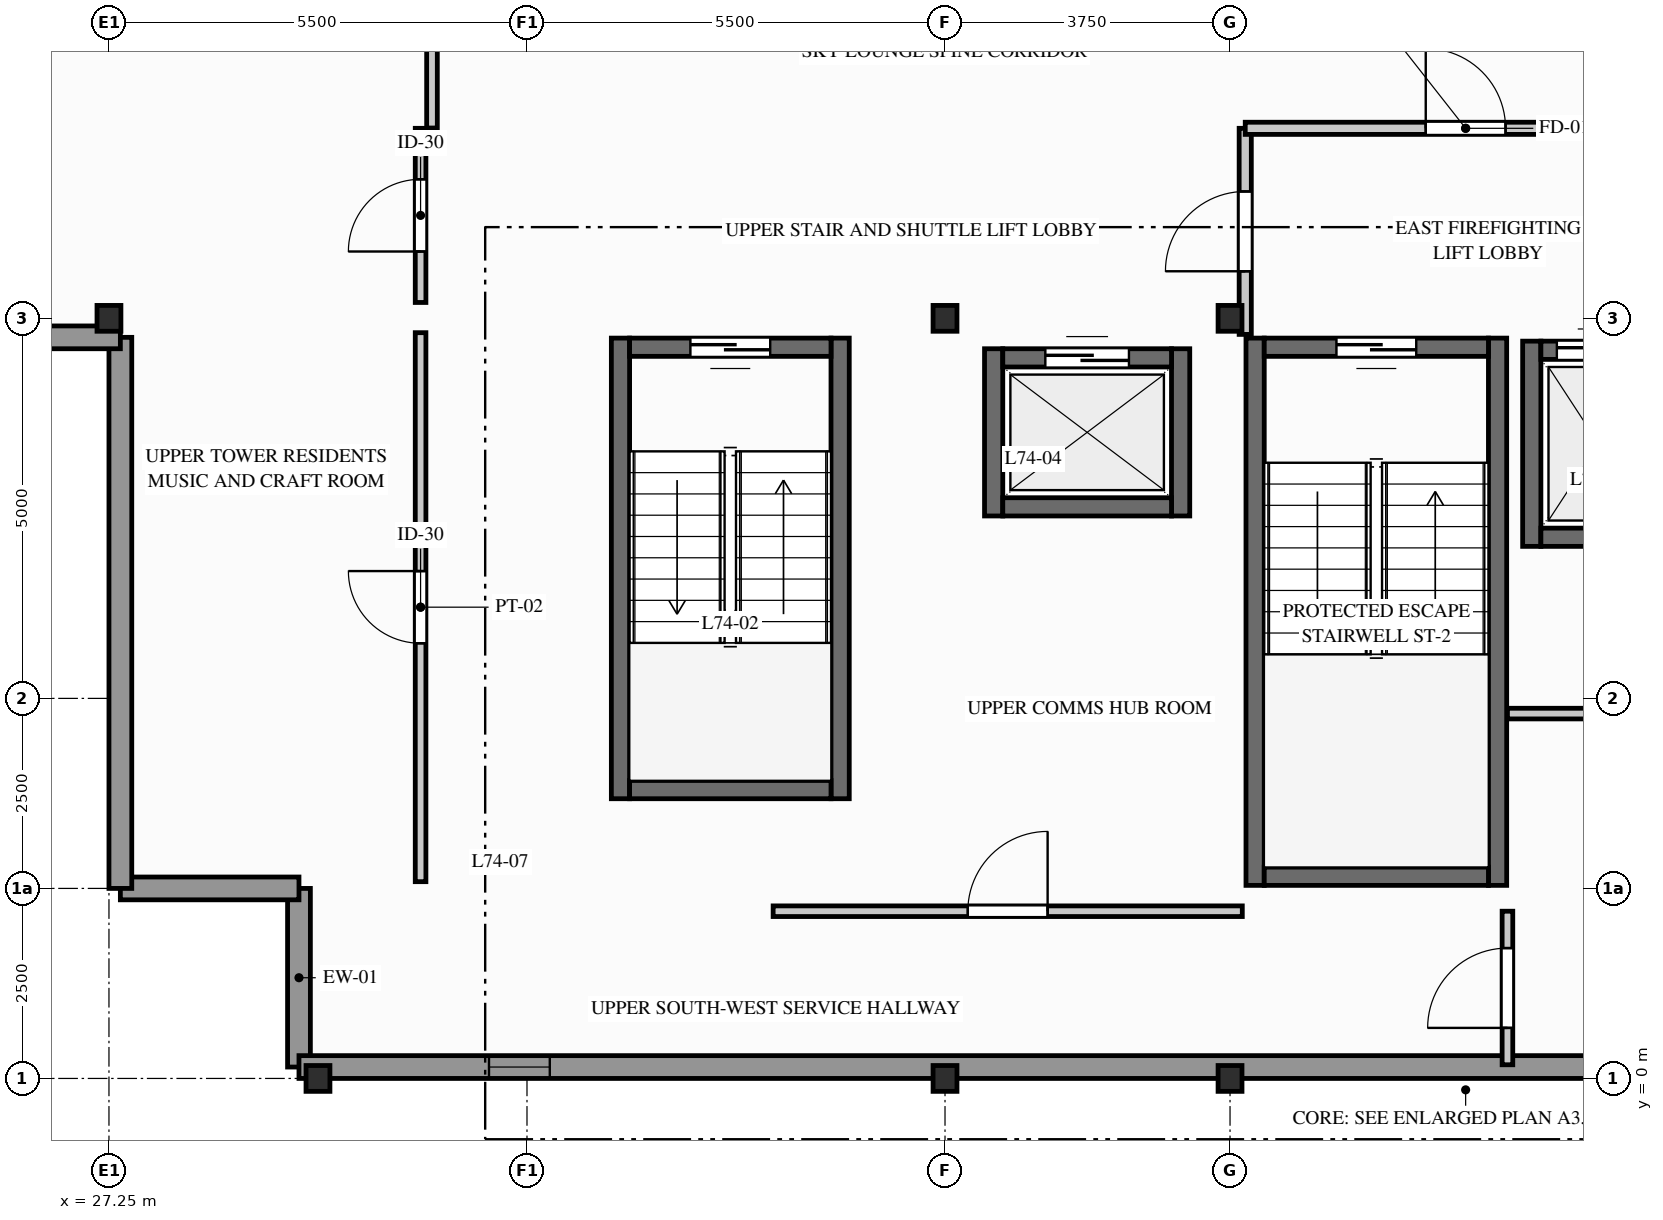
"""IFC4 building model, lengths in metres.
Left out: names, types, materials, properties, quantities, classifications, styles, units other than length and angle.
Written with IfcOpenShell. Run it as: python <this file> out.ifc"""

import sys

from ifc_helpers import new_model, si_unit, direction, frame, frame_2d, origin, origin_2d, place, context, subcontext, project, spatial, rectangle, i_section, extrude, element, fill, save


model = new_model("IFC4")
c1 = context("Model", 3, precision=1e-05, world=origin(), true_north=direction((0.0, 1.0)))
c2 = subcontext(c1, "Body", "Model", "MODEL_VIEW")
j1 = project(units=[si_unit("LENGTHUNIT", "METRE"), si_unit("PLANEANGLEUNIT", "RADIAN")], contexts=[c1])
p1 = place(None, origin())
s1 = spatial("IfcSite", under=j1, at=p1, CompositionType="ELEMENT")
p2 = place(p1, origin())
s2 = spatial("IfcBuilding", under=s1, at=p2, CompositionType="ELEMENT")
p3 = place(p2, frame((0.0, 0.0, 243.65)))
s3 = spatial("IfcBuildingStorey", under=s2, at=p3, CompositionType="ELEMENT", Elevation=243.65)
for number, where, z_axis, x_axis in (
    (1, (27.25, 10.0, 0.0), (0.0, 0.0, 1.0), (1.0, 0.0, 0.0)),
    (2, (30.0, 0.0, 0.0), (0.0, 0.0, 1.0), (1.0, 0.0, 0.0)),
    (3, (38.25, 0.0, 0.0), (0.0, 0.0, 1.0), (1.0, 0.0, 0.0)),
    (4, (38.25, 10.0, 0.0), (0.0, 0.0, 1.0), (1.0, 0.0, 0.0)),
    (5, (42.0, 0.0, 0.0), (0.0, 0.0, 1.0), (1.0, 0.0, 0.0)),
    (6, (42.0, 10.0, 0.0), (0.0, 0.0, 1.0), (1.0, 0.0, 0.0)),
):
    element("IfcColumn", number, at=place(p3, frame(where, z_axis=z_axis, x_axis=x_axis)), inside=s3, PredefinedType="COLUMN", context=c2, shape_type="SweptSolid", body=[
        extrude(i_section(OverallWidth=0.314, OverallDepth=0.34, WebThickness=0.019, FlangeThickness=0.031, FilletRadius=0.015, at=origin_2d()), origin(), (0.0, 0.0, 1.0), 3.6),
    ])
for number, where, z_axis, x_axis in (
    (7, (29.75, 2.5, 0.0), (0.0, 0.0, 1.0), (0.0, -1.0, 0.0)),
    (8, (27.4, 2.5, 0.0), (0.0, 0.0, 1.0), (1.0, 0.0, 0.0)),
):
    element("IfcWall", number, at=place(p3, frame(where, z_axis=z_axis, x_axis=x_axis)), inside=s3, PredefinedType="STANDARD", context=c2, shape_type="SweptSolid", body=[
        extrude(rectangle(XDim=2.35, YDim=0.3, at=frame_2d((1.175, 0.0))), origin(), (0.0, 0.0, 1.0), 3.34),
    ])
p4 = place(p3, frame((29.75, 0.15, 0.0), z_axis=(0.0, 0.0, 1.0), x_axis=(1.0, 0.0, 0.0)))
e9 = element("IfcWall", 9, at=p4, inside=s3, PredefinedType="STANDARD", context=c2, shape_type="SweptSolid", body=[
    extrude(rectangle(XDim=27.75, YDim=0.3, at=frame_2d((13.875, 0.0))), origin(), (0.0, 0.0, 1.0), 2.776),
])
p5 = place(p4, frame((2.5, 0.0, 1.05)))
e10 = element("IfcOpeningElement", 10, at=p5, cuts=e9, PredefinedType="OPENING", context=c2, shape_type="SweptSolid", body=[
    extrude(rectangle(XDim=0.8, YDim=1.4, at=frame_2d((0.4, 0.7))), frame((0.0, 0.16, 0.0), z_axis=(0.0, -1.0, 0.0), x_axis=(1.0, 0.0, 0.0)), (0.0, 0.0, 1.0), 0.32),
])
p6 = place(p4, frame((20.5, 0.0, 0.755)))
e11 = element("IfcOpeningElement", 11, at=p6, cuts=e9, PredefinedType="OPENING", context=c2, shape_type="SweptSolid", body=[
    extrude(rectangle(XDim=1.5, YDim=1.8, at=frame_2d((0.75, 0.9))), frame((0.0, 0.16, 0.0), z_axis=(0.0, -1.0, 0.0), x_axis=(1.0, 0.0, 0.0)), (0.0, 0.0, 1.0), 0.32),
])
p7 = place(p3, frame((27.4, 9.75, 0.0), z_axis=(0.0, 0.0, 1.0), x_axis=(0.0, -1.0, 0.0)))
e12 = element("IfcWall", 12, at=p7, inside=s3, PredefinedType="STANDARD", context=c2, shape_type="SweptSolid", body=[
    extrude(rectangle(XDim=7.25, YDim=0.3, at=frame_2d((3.625, 0.0))), origin(), (0.0, 0.0, 1.0), 3.34),
])
p8 = place(p3, frame((27.4, 9.75, 0.0), z_axis=(0.0, 0.0, 1.0), x_axis=(-1.0, 0.0, 0.0)))
e13 = element("IfcWall", 13, at=p8, inside=s3, PredefinedType="STANDARD", context=c2, shape_type="SweptSolid", body=[
    extrude(rectangle(XDim=7.2, YDim=0.3, at=frame_2d((3.6, 0.0))), origin(), (0.0, 0.0, 1.0), 2.279),
])
for number, where, z_axis, x_axis in (
    (14, (42.33, 2.54, 0.0), (0.0, 0.0, 1.0), (0.0, 1.0, 0.0)),
    (15, (45.52, 2.54, 0.0), (0.0, 0.0, 1.0), (0.0, 1.0, 0.0)),
):
    element("IfcWall", number, at=place(p3, frame(where, z_axis=z_axis, x_axis=x_axis)), inside=s3, PredefinedType="SHEAR", context=c2, shape_type="SweptSolid", body=[
        extrude(rectangle(XDim=7.2, YDim=0.24, at=frame_2d((3.6, 0.0))), origin(), (0.0, 0.0, 1.0), 3.34),
    ])
p9 = place(p3, frame((42.45, 2.66, 0.0), z_axis=(0.0, 0.0, 1.0), x_axis=(1.0, 0.0, 0.0)))
e16 = element("IfcWall", 16, at=p9, inside=s3, PredefinedType="SHEAR", context=c2, shape_type="SweptSolid", body=[
    extrude(rectangle(XDim=2.95, YDim=0.24, at=frame_2d((1.475, 0.0))), origin(), (0.0, 0.0, 1.0), 3.34),
])
p10 = place(p3, frame((45.4, 9.62, 0.0), z_axis=(0.0, 0.0, 1.0), x_axis=(-1.0, 0.0, 0.0)))
e17 = element("IfcWall", 17, at=p10, inside=s3, PredefinedType="SHEAR", context=c2, shape_type="SweptSolid", body=[
    extrude(rectangle(XDim=2.95, YDim=0.24, at=frame_2d((1.475, 0.0))), origin(), (0.0, 0.0, 1.0), 3.34),
])
p11 = place(p10, frame((0.95, 0.0, 0.0)))
e18 = element("IfcOpeningElement", 18, at=p11, cuts=e17, PredefinedType="OPENING", context=c2, shape_type="SweptSolid", body=[
    extrude(rectangle(XDim=1.05, YDim=2.06, at=frame_2d((0.525, 1.03))), frame((0.0, 0.13, 0.0), z_axis=(0.0, -1.0, 0.0), x_axis=(1.0, 0.0, 0.0)), (0.0, 0.0, 1.0), 0.26),
])
for number, where, z_axis, x_axis in (
    (19, (33.98, 3.68, 0.0), (0.0, 0.0, 1.0), (0.0, 1.0, 0.0)),
    (20, (36.87, 3.68, 0.0), (0.0, 0.0, 1.0), (0.0, 1.0, 0.0)),
):
    element("IfcWall", number, at=place(p3, frame(where, z_axis=z_axis, x_axis=x_axis)), inside=s3, PredefinedType="SHEAR", context=c2, shape_type="SweptSolid", body=[
        extrude(rectangle(XDim=6.06, YDim=0.24, at=frame_2d((3.03, 0.0))), origin(), (0.0, 0.0, 1.0), 3.34),
    ])
p12 = place(p3, frame((34.1, 3.8, 0.0), z_axis=(0.0, 0.0, 1.0), x_axis=(1.0, 0.0, 0.0)))
e21 = element("IfcWall", 21, at=p12, inside=s3, PredefinedType="SHEAR", context=c2, shape_type="SweptSolid", body=[
    extrude(rectangle(XDim=2.65, YDim=0.24, at=frame_2d((1.325, 0.0))), origin(), (0.0, 0.0, 1.0), 3.34),
])
p13 = place(p3, frame((36.75, 9.62, 0.0), z_axis=(0.0, 0.0, 1.0), x_axis=(-1.0, 0.0, 0.0)))
e22 = element("IfcWall", 22, at=p13, inside=s3, PredefinedType="SHEAR", context=c2, shape_type="SweptSolid", body=[
    extrude(rectangle(XDim=2.65, YDim=0.24, at=frame_2d((1.325, 0.0))), origin(), (0.0, 0.0, 1.0), 3.34),
])
p14 = place(p13, frame((0.8, 0.0, 0.0)))
e23 = element("IfcOpeningElement", 23, at=p14, cuts=e22, PredefinedType="OPENING", context=c2, shape_type="SweptSolid", body=[
    extrude(rectangle(XDim=1.05, YDim=2.06, at=frame_2d((0.525, 1.03))), frame((0.0, 0.13, 0.0), z_axis=(0.0, -1.0, 0.0), x_axis=(1.0, 0.0, 0.0)), (0.0, 0.0, 1.0), 0.26),
])
p15 = place(p3, frame((45.97, 7.0, 0.0), z_axis=(0.0, 0.0, 1.0), x_axis=(0.0, 1.0, 0.0)))
e24 = element("IfcWall", 24, at=p15, inside=s3, PredefinedType="SHEAR", context=c2, shape_type="SweptSolid", body=[
    extrude(rectangle(XDim=2.7, YDim=0.24, at=frame_2d((1.35, 0.0))), origin(), (0.0, 0.0, 1.0), 3.34),
])
p16 = place(p3, frame((46.09, 7.12, 0.0), z_axis=(0.0, 0.0, 1.0), x_axis=(1.0, 0.0, 0.0)))
e25 = element("IfcWall", 25, at=p16, inside=s3, PredefinedType="SHEAR", context=c2, shape_type="SweptSolid", body=[
    extrude(rectangle(XDim=1.52, YDim=0.24, at=frame_2d((0.76, 0.0))), origin(), (0.0, 0.0, 1.0), 3.34),
])
p17 = place(p3, frame((46.09, 9.58, 0.0), z_axis=(0.0, 0.0, 1.0), x_axis=(1.0, 0.0, 0.0)))
e26 = element("IfcWall", 26, at=p17, inside=s3, PredefinedType="SHEAR", context=c2, shape_type="SweptSolid", body=[
    extrude(rectangle(XDim=1.52, YDim=0.24, at=frame_2d((0.76, 0.0))), origin(), (0.0, 0.0, 1.0), 3.34),
])
p18 = place(p17, frame((0.21, 0.0, 0.0)))
e27 = element("IfcOpeningElement", 27, at=p18, cuts=e26, PredefinedType="OPENING", context=c2, shape_type="SweptSolid", body=[
    extrude(rectangle(XDim=1.1, YDim=2.06, at=frame_2d((0.55, 1.03))), frame((0.0, 0.13, 0.0), z_axis=(0.0, -1.0, 0.0), x_axis=(1.0, 0.0, 0.0)), (0.0, 0.0, 1.0), 0.26),
])
for number, where, z_axis, x_axis in (
    (28, (38.89, 7.4, 0.0), (0.0, 0.0, 1.0), (0.0, 1.0, 0.0)),
    (29, (41.35, 7.4, 0.0), (0.0, 0.0, 1.0), (0.0, 1.0, 0.0)),
):
    element("IfcWall", number, at=place(p3, frame(where, z_axis=z_axis, x_axis=x_axis)), inside=s3, PredefinedType="SHEAR", context=c2, shape_type="SweptSolid", body=[
        extrude(rectangle(XDim=2.2, YDim=0.24, at=frame_2d((1.1, 0.0))), origin(), (0.0, 0.0, 1.0), 3.34),
    ])
p19 = place(p3, frame((39.01, 7.52, 0.0), z_axis=(0.0, 0.0, 1.0), x_axis=(1.0, 0.0, 0.0)))
e30 = element("IfcWall", 30, at=p19, inside=s3, PredefinedType="SHEAR", context=c2, shape_type="SweptSolid", body=[
    extrude(rectangle(XDim=2.22, YDim=0.24, at=frame_2d((1.11, 0.0))), origin(), (0.0, 0.0, 1.0), 3.34),
])
p20 = place(p3, frame((39.01, 9.48, 0.0), z_axis=(0.0, 0.0, 1.0), x_axis=(1.0, 0.0, 0.0)))
e31 = element("IfcWall", 31, at=p20, inside=s3, PredefinedType="SHEAR", context=c2, shape_type="SweptSolid", body=[
    extrude(rectangle(XDim=2.22, YDim=0.24, at=frame_2d((1.11, 0.0))), origin(), (0.0, 0.0, 1.0), 3.34),
])
p21 = place(p20, frame((0.56, 0.0, 0.0)))
e32 = element("IfcOpeningElement", 32, at=p21, cuts=e31, PredefinedType="OPENING", context=c2, shape_type="SweptSolid", body=[
    extrude(rectangle(XDim=1.1, YDim=2.06, at=frame_2d((0.55, 1.03))), frame((0.0, 0.13, 0.0), z_axis=(0.0, -1.0, 0.0), x_axis=(1.0, 0.0, 0.0)), (0.0, 0.0, 1.0), 0.26),
])
p22 = place(p3, frame((31.35, 2.589, 0.0), z_axis=(0.0, 0.0, 1.0), x_axis=(0.0, 1.0, 0.0)))
e33 = element("IfcWall", 33, at=p22, inside=s3, PredefinedType="PARTITIONING", context=c2, shape_type="SweptSolid", body=[
    extrude(rectangle(XDim=7.223, YDim=0.14, at=frame_2d((3.611, 0.0))), origin(), (0.0, 0.0, 1.0), 3.34),
])
p23 = place(p22, frame((3.136, 0.0, 0.0)))
e34 = element("IfcOpeningElement", 34, at=p23, cuts=e33, PredefinedType="OPENING", context=c2, shape_type="SweptSolid", body=[
    extrude(rectangle(XDim=0.95, YDim=2.05, at=frame_2d((0.475, 1.025))), frame((0.0, 0.08, 0.0), z_axis=(0.0, -1.0, 0.0), x_axis=(1.0, 0.0, 0.0)), (0.0, 0.0, 1.0), 0.16),
])
p24 = place(p3, frame((31.35, 10.209, 0.0), z_axis=(0.0, 0.0, 1.0), x_axis=(0.0, 1.0, 0.0)))
e35 = element("IfcWall", 35, at=p24, inside=s3, PredefinedType="PARTITIONING", context=c2, shape_type="SweptSolid", body=[
    extrude(rectangle(XDim=2.291, YDim=0.14, at=frame_2d((1.146, 0.0))), origin(), (0.0, 0.0, 1.0), 3.34),
])
p25 = place(p24, frame((0.671, 0.0, 0.0)))
e36 = element("IfcOpeningElement", 36, at=p25, cuts=e35, PredefinedType="OPENING", context=c2, shape_type="SweptSolid", body=[
    extrude(rectangle(XDim=0.95, YDim=2.05, at=frame_2d((0.475, 1.025))), frame((0.0, 0.08, 0.0), z_axis=(0.0, -1.0, 0.0), x_axis=(1.0, 0.0, 0.0)), (0.0, 0.0, 1.0), 0.16),
])
p26 = place(p3, frame((35.989, 2.2, 0.0), z_axis=(0.0, 0.0, 1.0), x_axis=(1.0, 0.0, 0.0)))
e37 = element("IfcWall", 37, at=p26, inside=s3, PredefinedType="PARTITIONING", context=c2, shape_type="SweptSolid", body=[
    extrude(rectangle(XDim=6.173, YDim=0.14, at=frame_2d((3.086, 0.0))), origin(), (0.0, 0.0, 1.0), 2.703),
])
p27 = place(p26, frame((2.561, 0.0, 0.0)))
e38 = element("IfcOpeningElement", 38, at=p27, cuts=e37, PredefinedType="OPENING", context=c2, shape_type="SweptSolid", body=[
    extrude(rectangle(XDim=1.05, YDim=2.06, at=frame_2d((0.525, 1.03))), frame((0.0, 0.08, 0.0), z_axis=(0.0, -1.0, 0.0), x_axis=(1.0, 0.0, 0.0)), (0.0, 0.0, 1.0), 0.16),
])
p28 = place(p3, frame((45.65, 0.18, 0.0), z_axis=(0.0, 0.0, 1.0), x_axis=(0.0, 1.0, 0.0)))
e39 = element("IfcWall", 39, at=p28, inside=s3, PredefinedType="PARTITIONING", context=c2, shape_type="SweptSolid", body=[
    extrude(rectangle(XDim=2.02, YDim=0.14, at=frame_2d((1.01, 0.0))), origin(), (0.0, 0.0, 1.0), 3.34),
])
p29 = place(p28, frame((0.485, 0.0, 0.0)))
e40 = element("IfcOpeningElement", 40, at=p29, cuts=e39, PredefinedType="OPENING", context=c2, shape_type="SweptSolid", body=[
    extrude(rectangle(XDim=1.05, YDim=2.06, at=frame_2d((0.525, 1.03))), frame((0.0, 0.08, 0.0), z_axis=(0.0, -1.0, 0.0), x_axis=(1.0, 0.0, 0.0)), (0.0, 0.0, 1.0), 0.16),
])
p30 = place(p3, frame((45.65, 4.8, 0.0), z_axis=(0.0, 0.0, 1.0), x_axis=(1.0, 0.0, 0.0)))
e41 = element("IfcWall", 41, at=p30, inside=s3, PredefinedType="PARTITIONING", context=c2, shape_type="SweptSolid", body=[
    extrude(rectangle(XDim=8.5, YDim=0.14, at=frame_2d((4.25, 0.0))), origin(), (0.0, 0.0, 1.0), 2.703),
])
p31 = place(p3, frame((42.2, 9.789, 0.0), z_axis=(0.0, 0.0, 1.0), x_axis=(0.0, 1.0, 0.0)))
e42 = element("IfcWall", 42, at=p31, inside=s3, PredefinedType="PARTITIONING", context=c2, shape_type="SweptSolid", body=[
    extrude(rectangle(XDim=2.711, YDim=0.16, at=frame_2d((1.355, 0.0))), origin(), (0.0, 0.0, 1.0), 2.279),
])
p32 = place(p31, frame((0.831, 0.0, 0.0)))
e43 = element("IfcOpeningElement", 43, at=p32, cuts=e42, PredefinedType="OPENING", context=c2, shape_type="SweptSolid", body=[
    extrude(rectangle(XDim=1.05, YDim=2.06, at=frame_2d((0.525, 1.03))), frame((0.0, 0.09, 0.0), z_axis=(0.0, -1.0, 0.0), x_axis=(1.0, 0.0, 0.0)), (0.0, 0.0, 1.0), 0.18),
])
p33 = place(p3, frame((42.2, 12.5, 0.0), z_axis=(0.0, 0.0, 1.0), x_axis=(1.0, 0.0, 0.0)))
e44 = element("IfcWall", 44, at=p33, inside=s3, PredefinedType="PARTITIONING", context=c2, shape_type="SweptSolid", body=[
    extrude(rectangle(XDim=5.8, YDim=0.16, at=frame_2d((2.9, 0.0))), origin(), (0.0, 0.0, 1.0), 2.703),
])
p34 = place(p33, frame((2.375, 0.0, 0.0)))
e45 = element("IfcOpeningElement", 45, at=p34, cuts=e44, PredefinedType="OPENING", context=c2, shape_type="SweptSolid", body=[
    extrude(rectangle(XDim=1.05, YDim=2.06, at=frame_2d((0.525, 1.03))), frame((0.0, 0.09, 0.0), z_axis=(0.0, -1.0, 0.0), x_axis=(1.0, 0.0, 0.0)), (0.0, 0.0, 1.0), 0.18),
])
p35 = place(p3, frame((31.5, 12.504, 0.0), z_axis=(0.0, 0.0, 1.0), x_axis=(0.0, 1.0, 0.0)))
e46 = element("IfcWall", 46, at=p35, inside=s3, PredefinedType="PARTITIONING", context=c2, shape_type="SweptSolid", body=[
    extrude(rectangle(XDim=1.996, YDim=0.14, at=frame_2d((0.998, 0.0))), origin(), (0.0, 0.0, 1.0), 3.34),
])
p36 = place(p5, origin())
e47 = element("IfcWindow", 47, at=p36, inside=s3, PartitioningType="SINGLE_PANEL", PredefinedType="WINDOW", context=c2, shape_type="SweptSolid", body=[
    extrude(rectangle(XDim=0.8, YDim=1.4, at=frame_2d((0.4, 0.7))), frame((0.0, 0.03, 0.0), z_axis=(0.0, -1.0, 0.0), x_axis=(1.0, 0.0, 0.0)), (0.0, 0.0, 1.0), 0.06),
])
fill(e10, e47)
p37 = place(p11, origin())
e48 = element("IfcDoor", 48, at=p37, inside=s3, OperationType="SINGLE_SWING_LEFT", PredefinedType="DOOR", context=c2, shape_type="SweptSolid", body=[
    extrude(rectangle(XDim=1.05, YDim=2.06, at=frame_2d((0.525, 1.03))), frame((0.0, 0.025, 0.0), z_axis=(0.0, -1.0, 0.0), x_axis=(1.0, 0.0, 0.0)), (0.0, 0.0, 1.0), 0.05),
])
fill(e18, e48)
p38 = place(p14, origin())
e49 = element("IfcDoor", 49, at=p38, inside=s3, OperationType="SINGLE_SWING_LEFT", PredefinedType="DOOR", context=c2, shape_type="SweptSolid", body=[
    extrude(rectangle(XDim=1.05, YDim=2.06, at=frame_2d((0.525, 1.03))), frame((0.0, 0.025, 0.0), z_axis=(0.0, -1.0, 0.0), x_axis=(1.0, 0.0, 0.0)), (0.0, 0.0, 1.0), 0.05),
])
fill(e23, e49)
p39 = place(p18, origin())
e50 = element("IfcDoor", 50, at=p39, inside=s3, OperationType="SLIDING_TO_LEFT", PredefinedType="DOOR", context=c2, shape_type="SweptSolid", body=[
    extrude(rectangle(XDim=1.1, YDim=2.06, at=frame_2d((0.55, 1.03))), frame((0.0, 0.025, 0.0), z_axis=(0.0, -1.0, 0.0), x_axis=(1.0, 0.0, 0.0)), (0.0, 0.0, 1.0), 0.05),
])
fill(e27, e50)
p40 = place(p21, origin())
e51 = element("IfcDoor", 51, at=p40, inside=s3, OperationType="SLIDING_TO_RIGHT", PredefinedType="DOOR", context=c2, shape_type="SweptSolid", body=[
    extrude(rectangle(XDim=1.1, YDim=2.06, at=frame_2d((0.55, 1.03))), frame((0.0, 0.025, 0.0), z_axis=(0.0, -1.0, 0.0), x_axis=(1.0, 0.0, 0.0)), (0.0, 0.0, 1.0), 0.05),
])
fill(e32, e51)
p41 = place(p23, origin())
e52 = element("IfcDoor", 52, at=p41, inside=s3, OperationType="SINGLE_SWING_RIGHT", PredefinedType="DOOR", context=c2, shape_type="SweptSolid", body=[
    extrude(rectangle(XDim=0.95, YDim=2.05, at=frame_2d((0.475, 1.025))), frame((0.0, 0.025, 0.0), z_axis=(0.0, -1.0, 0.0), x_axis=(1.0, 0.0, 0.0)), (0.0, 0.0, 1.0), 0.05),
])
fill(e34, e52)
p42 = place(p25, origin())
e53 = element("IfcDoor", 53, at=p42, inside=s3, OperationType="SINGLE_SWING_LEFT", PredefinedType="DOOR", context=c2, shape_type="SweptSolid", body=[
    extrude(rectangle(XDim=0.95, YDim=2.05, at=frame_2d((0.475, 1.025))), frame((0.0, 0.025, 0.0), z_axis=(0.0, -1.0, 0.0), x_axis=(1.0, 0.0, 0.0)), (0.0, 0.0, 1.0), 0.05),
])
fill(e36, e53)
p43 = place(p27, origin())
e54 = element("IfcDoor", 54, at=p43, inside=s3, OperationType="SINGLE_SWING_RIGHT", PredefinedType="DOOR", context=c2, shape_type="SweptSolid", body=[
    extrude(rectangle(XDim=1.05, YDim=2.06, at=frame_2d((0.525, 1.03))), frame((0.0, 0.025, 0.0), z_axis=(0.0, -1.0, 0.0), x_axis=(1.0, 0.0, 0.0)), (0.0, 0.0, 1.0), 0.05),
])
fill(e38, e54)
p44 = place(p29, origin())
e55 = element("IfcDoor", 55, at=p44, inside=s3, OperationType="SINGLE_SWING_LEFT", PredefinedType="DOOR", context=c2, shape_type="SweptSolid", body=[
    extrude(rectangle(XDim=1.05, YDim=2.06, at=frame_2d((0.525, 1.03))), frame((0.0, 0.025, 0.0), z_axis=(0.0, -1.0, 0.0), x_axis=(1.0, 0.0, 0.0)), (0.0, 0.0, 1.0), 0.05),
])
fill(e40, e55)
p45 = place(p32, origin())
e56 = element("IfcDoor", 56, at=p45, inside=s3, OperationType="SINGLE_SWING_LEFT", PredefinedType="DOOR", context=c2, shape_type="SweptSolid", body=[
    extrude(rectangle(XDim=1.05, YDim=2.06, at=frame_2d((0.525, 1.03))), frame((0.0, 0.025, 0.0), z_axis=(0.0, -1.0, 0.0), x_axis=(1.0, 0.0, 0.0)), (0.0, 0.0, 1.0), 0.05),
])
fill(e43, e56)
p46 = place(p34, origin())
e57 = element("IfcDoor", 57, at=p46, inside=s3, OperationType="SINGLE_SWING_LEFT", PredefinedType="DOOR", context=c2, shape_type="SweptSolid", body=[
    extrude(rectangle(XDim=1.05, YDim=2.06, at=frame_2d((0.525, 1.03))), frame((0.0, 0.025, 0.0), z_axis=(0.0, -1.0, 0.0), x_axis=(1.0, 0.0, 0.0)), (0.0, 0.0, 1.0), 0.05),
])
fill(e45, e57)
save(model, sys.argv[1])
